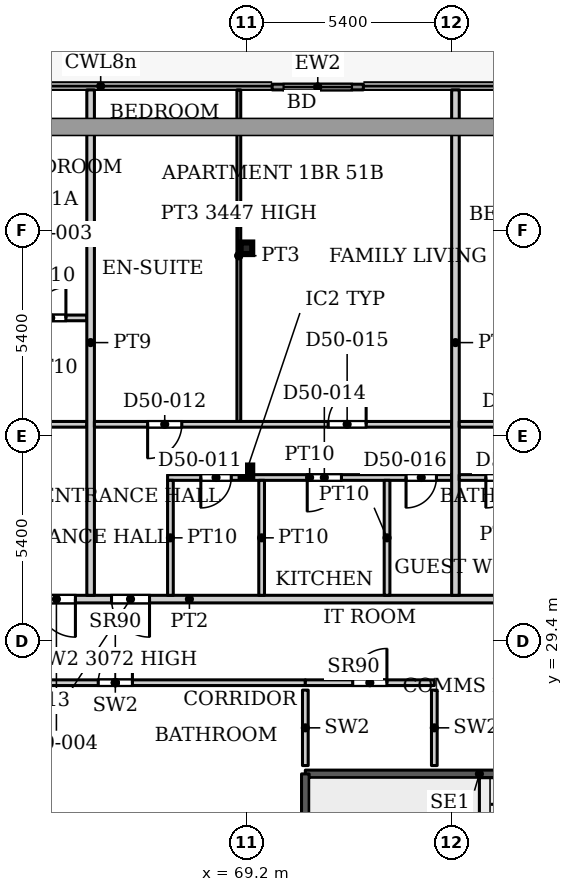
"""IFC4 building model, lengths in metres.
Left out: names, types, materials, properties, quantities, classifications, styles, units other than length and angle.
Written with IfcOpenShell. Run it as: python <this file> out.ifc"""

import sys

from ifc_helpers import new_model, si_unit, direction, frame, frame_2d, origin, origin_2d, place, context, subcontext, project, spatial, rectangle, hollow_rectangle, extrude, source, transform, mapped, element, fill, save


model = new_model("IFC4")
c1 = context("Model", 3, precision=1e-05, world=origin(), true_north=direction((0.0, 1.0)))
c2 = subcontext(c1, "Body", "Model", "MODEL_VIEW")
j1 = project(units=[si_unit("LENGTHUNIT", "METRE"), si_unit("PLANEANGLEUNIT", "RADIAN")], contexts=[c1])
p1 = place(None, origin())
s1 = spatial("IfcSite", under=j1, at=p1, CompositionType="ELEMENT")
p2 = place(p1, origin())
s2 = spatial("IfcBuilding", under=s1, at=p2, CompositionType="ELEMENT")
p3 = place(p2, frame((0.0, 0.0, 220.1)))
s3 = spatial("IfcBuildingStorey", under=s2, at=p3, CompositionType="ELEMENT", Elevation=220.1)
for number, where, z_axis, x_axis in (
    (1, (69.2, 33.863, 0.0), (0.0, 0.0, 1.0), (1.0, 0.0, 0.0)),
    (2, (69.2, 39.732, 0.0), (0.0, 0.0, 1.0), (1.0, 0.0, 0.0)),
):
    element("IfcColumn", number, at=place(p3, frame(where, z_axis=z_axis, x_axis=x_axis)), inside=s3, PredefinedType="COLUMN", context=c2, shape_type="SweptSolid", body=[
        extrude(hollow_rectangle(XDim=0.305, YDim=0.305, WallThickness=0.016, InnerFilletRadius=0.016, OuterFilletRadius=0.032, at=origin_2d()), origin(), (0.0, 0.0, 1.0), 3.9),
    ])
p4 = place(p3, frame((69.877, 43.975, 0.0), z_axis=(0.0, 0.0, 1.0), x_axis=(1.0, 0.0, 0.0)))
e3 = element("IfcWall", 3, at=p4, inside=s3, PredefinedType="SOLIDWALL", context=c2, shape_type="SweptSolid", body=[
    extrude(rectangle(XDim=2.4, YDim=0.15, at=frame_2d((1.2, 0.0))), origin(), (0.0, 0.0, 1.0), 3.75),
])
p5 = place(p4, frame((0.3, 0.0, 0.0)))
e4 = element("IfcOpeningElement", 4, at=p5, cuts=e3, PredefinedType="OPENING", context=c2, shape_type="SweptSolid", body=[
    extrude(rectangle(XDim=1.8, YDim=2.4, at=frame_2d((0.9, 1.2))), frame((0.0, 0.085, 0.0), z_axis=(0.0, -1.0, 0.0), x_axis=(1.0, 0.0, 0.0)), (0.0, 0.0, 1.0), 0.17),
])
p6 = place(p3, frame((70.75, 25.9, 0.0), z_axis=(0.0, 0.0, 1.0), x_axis=(1.0, 0.0, 0.0)))
e5 = element("IfcWall", 5, at=p6, inside=s3, PredefinedType="SHEAR", context=c2, shape_type="SweptSolid", body=[
    extrude(rectangle(XDim=9.16, YDim=0.2, at=frame_2d((4.58, 0.0))), origin(), (0.0, 0.0, 1.0), 3.9),
])
p7 = place(p6, frame((7.81, 0.0, 0.0)))
e6 = element("IfcOpeningElement", 6, at=p7, cuts=e5, PredefinedType="OPENING", context=c2, shape_type="SweptSolid", body=[
    extrude(rectangle(XDim=1.1, YDim=2.2, at=frame_2d((0.55, 1.1))), frame((0.0, 0.11, 0.0), z_axis=(0.0, -1.0, 0.0), x_axis=(1.0, 0.0, 0.0)), (0.0, 0.0, 1.0), 0.22),
])
p8 = place(p3, frame((70.75, 22.75, 0.0), z_axis=(0.0, 0.0, 1.0), x_axis=(0.0, 1.0, 0.0)))
e7 = element("IfcWall", 7, at=p8, inside=s3, PredefinedType="SHEAR", context=c2, shape_type="SweptSolid", body=[
    extrude(rectangle(XDim=3.15, YDim=0.2, at=frame_2d((1.575, 0.0))), origin(), (0.0, 0.0, 1.0), 3.9),
])
p9 = place(p3, frame((60.75, 28.3, 0.0), z_axis=(0.0, 0.0, 1.0), x_axis=(1.0, 0.0, 0.0)))
e8 = element("IfcWall", 8, at=p9, inside=s3, PredefinedType="PARTITIONING", context=c2, shape_type="SweptSolid", body=[
    extrude(rectangle(XDim=10.0, YDim=0.15, at=frame_2d((5.0, 0.0))), origin(), (0.0, 0.0, 1.0), 3.072),
])
p10 = place(p9, frame((4.55, 0.0, 0.0)))
e9 = element("IfcOpeningElement", 9, at=p10, cuts=e8, PredefinedType="OPENING", context=c2, shape_type="SweptSolid", body=[
    extrude(rectangle(XDim=0.9, YDim=2.2, at=frame_2d((0.45, 1.1))), frame((0.0, 0.085, 0.0), z_axis=(0.0, -1.0, 0.0), x_axis=(1.0, 0.0, 0.0)), (0.0, 0.0, 1.0), 0.17),
])
p11 = place(p3, frame((70.75, 26.12, 0.0), z_axis=(0.0, 0.0, 1.0), x_axis=(0.0, 1.0, 0.0)))
e10 = element("IfcWall", 10, at=p11, inside=s3, PredefinedType="PARTITIONING", context=c2, shape_type="SweptSolid", body=[
    extrude(rectangle(XDim=1.985, YDim=0.15, at=frame_2d((0.992, 0.0))), origin(), (0.0, 0.0, 1.0), 3.9),
])
p12 = place(p3, frame((70.75, 28.3, 0.0), z_axis=(0.0, 0.0, 1.0), x_axis=(1.0, 0.0, 0.0)))
e11 = element("IfcWall", 11, at=p12, inside=s3, PredefinedType="PARTITIONING", context=c2, shape_type="SweptSolid", body=[
    extrude(rectangle(XDim=3.394, YDim=0.15, at=frame_2d((1.697, 0.0))), origin(), (0.0, 0.0, 1.0), 3.9),
])
p13 = place(p12, frame((1.247, 0.0, 0.0)))
e12 = element("IfcOpeningElement", 12, at=p13, cuts=e11, PredefinedType="OPENING", context=c2, shape_type="SweptSolid", body=[
    extrude(rectangle(XDim=0.9, YDim=2.2, at=frame_2d((0.45, 1.1))), frame((0.0, 0.085, 0.0), z_axis=(0.0, -1.0, 0.0), x_axis=(1.0, 0.0, 0.0)), (0.0, 0.0, 1.0), 0.17),
])
p14 = place(p3, frame((74.144, 26.12, 0.0), z_axis=(0.0, 0.0, 1.0), x_axis=(0.0, 1.0, 0.0)))
e13 = element("IfcWall", 13, at=p14, inside=s3, PredefinedType="PARTITIONING", context=c2, shape_type="SweptSolid", body=[
    extrude(rectangle(XDim=1.985, YDim=0.15, at=frame_2d((0.992, 0.0))), origin(), (0.0, 0.0, 1.0), 3.9),
])
p15 = place(p3, frame((53.499, 30.5, 0.0), z_axis=(0.0, 0.0, 1.0), x_axis=(1.0, 0.0, 0.0)))
e14 = element("IfcWall", 14, at=p15, inside=s3, PredefinedType="PARTITIONING", context=c2, shape_type="SweptSolid", body=[
    extrude(rectangle(XDim=28.401, YDim=0.2, at=frame_2d((14.2, 0.0))), origin(), (0.0, 0.0, 1.0), 3.6),
])
p16 = place(p15, frame((10.201, 0.0, 0.0)))
e15 = element("IfcOpeningElement", 15, at=p16, cuts=e14, PredefinedType="OPENING", context=c2, shape_type="SweptSolid", body=[
    extrude(rectangle(XDim=1.0, YDim=2.1, at=frame_2d((0.5, 1.05))), frame((0.0, 0.11, 0.0), z_axis=(0.0, -1.0, 0.0), x_axis=(1.0, 0.0, 0.0)), (0.0, 0.0, 1.0), 0.22),
])
p17 = place(p15, frame((12.151, 0.0, 0.0)))
e16 = element("IfcOpeningElement", 16, at=p17, cuts=e14, PredefinedType="OPENING", context=c2, shape_type="SweptSolid", body=[
    extrude(rectangle(XDim=1.0, YDim=2.1, at=frame_2d((0.5, 1.05))), frame((0.0, 0.11, 0.0), z_axis=(0.0, -1.0, 0.0), x_axis=(1.0, 0.0, 0.0)), (0.0, 0.0, 1.0), 0.22),
])
p18 = place(p15, frame((24.001, 0.0, 0.0)))
e17 = element("IfcOpeningElement", 17, at=p18, cuts=e14, PredefinedType="OPENING", context=c2, shape_type="SweptSolid", body=[
    extrude(rectangle(XDim=1.0, YDim=2.1, at=frame_2d((0.5, 1.05))), frame((0.0, 0.11, 0.0), z_axis=(0.0, -1.0, 0.0), x_axis=(1.0, 0.0, 0.0)), (0.0, 0.0, 1.0), 0.22),
])
p19 = place(p3, frame((53.499, 35.1, 0.0), z_axis=(0.0, 0.0, 1.0), x_axis=(1.0, 0.0, 0.0)))
e18 = element("IfcWall", 18, at=p19, inside=s3, PredefinedType="PARTITIONING", context=c2, shape_type="SweptSolid", body=[
    extrude(rectangle(XDim=11.501, YDim=0.15, at=frame_2d((5.75, 0.0))), origin(), (0.0, 0.0, 1.0), 3.6),
])
p20 = place(p19, frame((5.001, 0.0, 0.0)))
e19 = element("IfcOpeningElement", 19, at=p20, cuts=e18, PredefinedType="OPENING", context=c2, shape_type="SweptSolid", body=[
    extrude(rectangle(XDim=0.9, YDim=2.1, at=frame_2d((0.45, 1.05))), frame((0.0, 0.085, 0.0), z_axis=(0.0, -1.0, 0.0), x_axis=(1.0, 0.0, 0.0)), (0.0, 0.0, 1.0), 0.17),
])
p21 = place(p19, frame((1.701, 0.0, 0.0)))
e20 = element("IfcOpeningElement", 20, at=p21, cuts=e18, PredefinedType="OPENING", context=c2, shape_type="SweptSolid", body=[
    extrude(rectangle(XDim=1.0, YDim=2.1, at=frame_2d((0.5, 1.05))), frame((0.0, 0.085, 0.0), z_axis=(0.0, -1.0, 0.0), x_axis=(1.0, 0.0, 0.0)), (0.0, 0.0, 1.0), 0.17),
])
p22 = place(p19, frame((7.701, 0.0, 0.0)))
e21 = element("IfcOpeningElement", 21, at=p22, cuts=e18, PredefinedType="OPENING", context=c2, shape_type="SweptSolid", body=[
    extrude(rectangle(XDim=0.9, YDim=2.1, at=frame_2d((0.45, 1.05))), frame((0.0, 0.085, 0.0), z_axis=(0.0, -1.0, 0.0), x_axis=(1.0, 0.0, 0.0)), (0.0, 0.0, 1.0), 0.17),
])
p23 = place(p3, frame((63.075, 37.9, 0.0), z_axis=(0.0, 0.0, 1.0), x_axis=(1.0, 0.0, 0.0)))
e22 = element("IfcWall", 22, at=p23, inside=s3, PredefinedType="PARTITIONING", context=c2, shape_type="SweptSolid", body=[
    extrude(rectangle(XDim=1.925, YDim=0.15, at=frame_2d((0.962, 0.0))), origin(), (0.0, 0.0, 1.0), 3.6),
])
p24 = place(p23, frame((0.575, 0.0, 0.0)))
e23 = element("IfcOpeningElement", 23, at=p24, cuts=e22, PredefinedType="OPENING", context=c2, shape_type="SweptSolid", body=[
    extrude(rectangle(XDim=0.8, YDim=2.1, at=frame_2d((0.4, 1.05))), frame((0.0, 0.085, 0.0), z_axis=(0.0, -1.0, 0.0), x_axis=(1.0, 0.0, 0.0)), (0.0, 0.0, 1.0), 0.17),
])
p25 = place(p3, frame((65.1, 30.6, 0.0), z_axis=(0.0, 0.0, 1.0), x_axis=(0.0, 1.0, 0.0)))
e24 = element("IfcWall", 24, at=p25, inside=s3, PredefinedType="PARTITIONING", context=c2, shape_type="SweptSolid", body=[
    extrude(rectangle(XDim=13.3, YDim=0.2, at=frame_2d((6.65, 0.0))), origin(), (0.0, 0.0, 1.0), 3.6),
])
p26 = place(p3, frame((65.2, 35.1, 0.0), z_axis=(0.0, 0.0, 1.0), x_axis=(1.0, 0.0, 0.0)))
e25 = element("IfcWall", 25, at=p26, inside=s3, PredefinedType="PARTITIONING", context=c2, shape_type="SweptSolid", body=[
    extrude(rectangle(XDim=9.4, YDim=0.15, at=frame_2d((4.7, 0.0))), origin(), (0.0, 0.0, 1.0), 3.6),
])
p27 = place(p26, frame((1.4, 0.0, 0.0)))
e26 = element("IfcOpeningElement", 26, at=p27, cuts=e25, PredefinedType="OPENING", context=c2, shape_type="SweptSolid", body=[
    extrude(rectangle(XDim=0.9, YDim=2.1, at=frame_2d((0.45, 1.05))), frame((0.0, 0.085, 0.0), z_axis=(0.0, -1.0, 0.0), x_axis=(1.0, 0.0, 0.0)), (0.0, 0.0, 1.0), 0.17),
])
p28 = place(p26, frame((6.15, 0.0, 0.0)))
e27 = element("IfcOpeningElement", 27, at=p28, cuts=e25, PredefinedType="OPENING", context=c2, shape_type="SweptSolid", body=[
    extrude(rectangle(XDim=1.0, YDim=2.1, at=frame_2d((0.5, 1.05))), frame((0.0, 0.085, 0.0), z_axis=(0.0, -1.0, 0.0), x_axis=(1.0, 0.0, 0.0)), (0.0, 0.0, 1.0), 0.17),
])
p29 = place(p3, frame((67.125, 33.7, 0.0), z_axis=(0.0, 0.0, 1.0), x_axis=(1.0, 0.0, 0.0)))
e28 = element("IfcWall", 28, at=p29, inside=s3, PredefinedType="PARTITIONING", context=c2, shape_type="SweptSolid", body=[
    extrude(rectangle(XDim=7.475, YDim=0.15, at=frame_2d((3.738, 0.0))), origin(), (0.0, 0.0, 1.0), 3.6),
])
p30 = place(p29, frame((0.875, 0.0, 0.0)))
e29 = element("IfcOpeningElement", 29, at=p30, cuts=e28, PredefinedType="OPENING", context=c2, shape_type="SweptSolid", body=[
    extrude(rectangle(XDim=0.8, YDim=2.1, at=frame_2d((0.4, 1.05))), frame((0.0, 0.085, 0.0), z_axis=(0.0, -1.0, 0.0), x_axis=(1.0, 0.0, 0.0)), (0.0, 0.0, 1.0), 0.17),
])
p31 = place(p29, frame((3.675, 0.0, 0.0)))
e30 = element("IfcOpeningElement", 30, at=p31, cuts=e28, PredefinedType="OPENING", context=c2, shape_type="SweptSolid", body=[
    extrude(rectangle(XDim=0.9, YDim=2.1, at=frame_2d((0.45, 1.05))), frame((0.0, 0.085, 0.0), z_axis=(0.0, -1.0, 0.0), x_axis=(1.0, 0.0, 0.0)), (0.0, 0.0, 1.0), 0.17),
])
p32 = place(p29, frame((6.275, 0.0, 0.0)))
e31 = element("IfcOpeningElement", 31, at=p32, cuts=e28, PredefinedType="OPENING", context=c2, shape_type="SweptSolid", body=[
    extrude(rectangle(XDim=0.8, YDim=2.1, at=frame_2d((0.4, 1.05))), frame((0.0, 0.085, 0.0), z_axis=(0.0, -1.0, 0.0), x_axis=(1.0, 0.0, 0.0)), (0.0, 0.0, 1.0), 0.17),
])
p33 = place(p3, frame((67.2, 30.6, 0.0), z_axis=(0.0, 0.0, 1.0), x_axis=(0.0, 1.0, 0.0)))
e32 = element("IfcWall", 32, at=p33, inside=s3, PredefinedType="PARTITIONING", context=c2, shape_type="SweptSolid", body=[
    extrude(rectangle(XDim=3.025, YDim=0.15, at=frame_2d((1.512, 0.0))), origin(), (0.0, 0.0, 1.0), 3.6),
])
p34 = place(p3, frame((69.0, 35.175, 0.0), z_axis=(0.0, 0.0, 1.0), x_axis=(0.0, 1.0, 0.0)))
e33 = element("IfcWall", 33, at=p34, inside=s3, PredefinedType="PARTITIONING", context=c2, shape_type="SweptSolid", body=[
    extrude(rectangle(XDim=8.725, YDim=0.1, at=frame_2d((4.362, 0.0))), origin(), (0.0, 0.0, 1.0), 3.447),
])
for number, where, z_axis, x_axis in (
    (34, (69.6, 30.6, 0.0), (0.0, 0.0, 1.0), (0.0, 1.0, 0.0)),
    (35, (72.9, 30.6, 0.0), (0.0, 0.0, 1.0), (0.0, 1.0, 0.0)),
):
    element("IfcWall", number, at=place(p3, frame(where, z_axis=z_axis, x_axis=x_axis)), inside=s3, PredefinedType="PARTITIONING", context=c2, shape_type="SweptSolid", body=[
        extrude(rectangle(XDim=3.025, YDim=0.15, at=frame_2d((1.512, 0.0))), origin(), (0.0, 0.0, 1.0), 3.6),
    ])
p35 = place(p3, frame((74.7, 30.6, 0.0), z_axis=(0.0, 0.0, 1.0), x_axis=(0.0, 1.0, 0.0)))
e36 = element("IfcWall", 36, at=p35, inside=s3, PredefinedType="PARTITIONING", context=c2, shape_type="SweptSolid", body=[
    extrude(rectangle(XDim=13.3, YDim=0.2, at=frame_2d((6.65, 0.0))), origin(), (0.0, 0.0, 1.0), 3.6),
])
p36 = place(p3, frame((74.8, 33.7, 0.0), z_axis=(0.0, 0.0, 1.0), x_axis=(1.0, 0.0, 0.0)))
e37 = element("IfcWall", 37, at=p36, inside=s3, PredefinedType="PARTITIONING", context=c2, shape_type="SweptSolid", body=[
    extrude(rectangle(XDim=2.225, YDim=0.15, at=frame_2d((1.112, 0.0))), origin(), (0.0, 0.0, 1.0), 3.6),
])
p37 = place(p36, frame((0.7, 0.0, 0.0)))
e38 = element("IfcOpeningElement", 38, at=p37, cuts=e37, PredefinedType="OPENING", context=c2, shape_type="SweptSolid", body=[
    extrude(rectangle(XDim=0.8, YDim=2.1, at=frame_2d((0.4, 1.05))), frame((0.0, 0.085, 0.0), z_axis=(0.0, -1.0, 0.0), x_axis=(1.0, 0.0, 0.0)), (0.0, 0.0, 1.0), 0.17),
])
p38 = place(p3, frame((74.8, 35.1, 0.0), z_axis=(0.0, 0.0, 1.0), x_axis=(1.0, 0.0, 0.0)))
e39 = element("IfcWall", 39, at=p38, inside=s3, PredefinedType="PARTITIONING", context=c2, shape_type="SweptSolid", body=[
    extrude(rectangle(XDim=8.9, YDim=0.15, at=frame_2d((4.45, 0.0))), origin(), (0.0, 0.0, 1.0), 3.6),
])
p39 = place(p38, frame((1.25, 0.0, 0.0)))
e40 = element("IfcOpeningElement", 40, at=p39, cuts=e39, PredefinedType="OPENING", context=c2, shape_type="SweptSolid", body=[
    extrude(rectangle(XDim=0.9, YDim=2.1, at=frame_2d((0.45, 1.05))), frame((0.0, 0.085, 0.0), z_axis=(0.0, -1.0, 0.0), x_axis=(1.0, 0.0, 0.0)), (0.0, 0.0, 1.0), 0.17),
])
p40 = place(p38, frame((5.7, 0.0, 0.0)))
e41 = element("IfcOpeningElement", 41, at=p40, cuts=e39, PredefinedType="OPENING", context=c2, shape_type="SweptSolid", body=[
    extrude(rectangle(XDim=1.0, YDim=2.1, at=frame_2d((0.5, 1.05))), frame((0.0, 0.085, 0.0), z_axis=(0.0, -1.0, 0.0), x_axis=(1.0, 0.0, 0.0)), (0.0, 0.0, 1.0), 0.17),
])
m1 = source(origin(), c2, "Body", "SweptSolid", [
    extrude(rectangle(XDim=1.8, YDim=2.4, at=frame_2d((0.9, 1.2))), frame((0.0, 0.025, 0.0), z_axis=(0.0, -1.0, 0.0), x_axis=(1.0, 0.0, 0.0)), (0.0, 0.0, 1.0), 0.05),
])
p41 = place(p5, origin())
e42 = element("IfcDoor", 42, at=p41, inside=s3, OperationType="SLIDING_TO_LEFT", PredefinedType="DOOR", context=c2, shape_type="MappedRepresentation", body=[
    mapped(m1, transform((0.0, 0.0, 0.0), x_axis=(1.0, 0.0, 0.0), y_axis=(0.0, 1.0, 0.0), z_axis=(0.0, 0.0, 1.0), scale=1.0)),
])
fill(e4, e42)
m2 = source(origin(), c2, "Body", "SweptSolid", [
    extrude(rectangle(XDim=0.9, YDim=2.2, at=frame_2d((0.45, 1.1))), frame((0.0, 0.025, 0.0), z_axis=(0.0, -1.0, 0.0), x_axis=(1.0, 0.0, 0.0)), (0.0, 0.0, 1.0), 0.05),
])
p42 = place(p10, origin())
e43 = element("IfcDoor", 43, at=p42, inside=s3, OperationType="SINGLE_SWING_LEFT", PredefinedType="DOOR", context=c2, shape_type="MappedRepresentation", body=[
    mapped(m2, transform((0.0, 0.0, 0.0), x_axis=(1.0, 0.0, 0.0), y_axis=(0.0, 1.0, 0.0), z_axis=(0.0, 0.0, 1.0), scale=1.0)),
])
fill(e9, e43)
p43 = place(p13, origin())
e44 = element("IfcDoor", 44, at=p43, inside=s3, OperationType="SINGLE_SWING_LEFT", PredefinedType="DOOR", context=c2, shape_type="MappedRepresentation", body=[
    mapped(m2, transform((0.0, 0.0, 0.0), x_axis=(1.0, 0.0, 0.0), y_axis=(0.0, 1.0, 0.0), z_axis=(0.0, 0.0, 1.0), scale=1.0)),
])
fill(e12, e44)
m3 = source(origin(), c2, "Body", "SweptSolid", [
    extrude(rectangle(XDim=0.8, YDim=2.1, at=frame_2d((0.4, 1.05))), frame((0.0, 0.025, 0.0), z_axis=(0.0, -1.0, 0.0), x_axis=(1.0, 0.0, 0.0)), (0.0, 0.0, 1.0), 0.05),
])
p44 = place(p24, origin())
e45 = element("IfcDoor", 45, at=p44, inside=s3, OperationType="SINGLE_SWING_LEFT", PredefinedType="DOOR", context=c2, shape_type="MappedRepresentation", body=[
    mapped(m3, transform((0.0, 0.0, 0.0), x_axis=(1.0, 0.0, 0.0), y_axis=(0.0, 1.0, 0.0), z_axis=(0.0, 0.0, 1.0), scale=1.0)),
])
fill(e23, e45)
m4 = source(origin(), c2, "Body", "SweptSolid", [
    extrude(rectangle(XDim=1.0, YDim=2.1, at=frame_2d((0.5, 1.05))), frame((0.0, 0.025, 0.0), z_axis=(0.0, -1.0, 0.0), x_axis=(1.0, 0.0, 0.0)), (0.0, 0.0, 1.0), 0.05),
])
p45 = place(p16, origin())
e46 = element("IfcDoor", 46, at=p45, inside=s3, OperationType="SINGLE_SWING_RIGHT", PredefinedType="DOOR", context=c2, shape_type="MappedRepresentation", body=[
    mapped(m4, transform((0.0, 0.0, 0.0), x_axis=(1.0, 0.0, 0.0), y_axis=(0.0, 1.0, 0.0), z_axis=(0.0, 0.0, 1.0), scale=1.0)),
])
fill(e15, e46)
p46 = place(p30, origin())
e47 = element("IfcDoor", 47, at=p46, inside=s3, OperationType="SINGLE_SWING_RIGHT", PredefinedType="DOOR", context=c2, shape_type="MappedRepresentation", body=[
    mapped(m3, transform((0.0, 0.0, 0.0), x_axis=(1.0, 0.0, 0.0), y_axis=(0.0, 1.0, 0.0), z_axis=(0.0, 0.0, 1.0), scale=1.0)),
])
fill(e29, e47)
m5 = source(origin(), c2, "Body", "SweptSolid", [
    extrude(rectangle(XDim=0.9, YDim=2.1, at=frame_2d((0.45, 1.05))), frame((0.0, 0.025, 0.0), z_axis=(0.0, -1.0, 0.0), x_axis=(1.0, 0.0, 0.0)), (0.0, 0.0, 1.0), 0.05),
])
p47 = place(p27, origin())
e48 = element("IfcDoor", 48, at=p47, inside=s3, OperationType="SINGLE_SWING_RIGHT", PredefinedType="DOOR", context=c2, shape_type="MappedRepresentation", body=[
    mapped(m5, transform((0.0, 0.0, 0.0), x_axis=(1.0, 0.0, 0.0), y_axis=(0.0, 1.0, 0.0), z_axis=(0.0, 0.0, 1.0), scale=1.0)),
])
fill(e26, e48)
p48 = place(p17, origin())
e49 = element("IfcDoor", 49, at=p48, inside=s3, OperationType="SINGLE_SWING_RIGHT", PredefinedType="DOOR", context=c2, shape_type="MappedRepresentation", body=[
    mapped(m4, transform((0.0, 0.0, 0.0), x_axis=(1.0, 0.0, 0.0), y_axis=(0.0, 1.0, 0.0), z_axis=(0.0, 0.0, 1.0), scale=1.0)),
])
fill(e16, e49)
p49 = place(p31, origin())
e50 = element("IfcDoor", 50, at=p49, inside=s3, OperationType="SINGLE_SWING_RIGHT", PredefinedType="DOOR", context=c2, shape_type="MappedRepresentation", body=[
    mapped(m5, transform((0.0, 0.0, 0.0), x_axis=(1.0, 0.0, 0.0), y_axis=(0.0, 1.0, 0.0), z_axis=(0.0, 0.0, 1.0), scale=1.0)),
])
fill(e30, e50)
m6 = source(origin(), c2, "Body", "SweptSolid", [
    extrude(rectangle(XDim=1.0, YDim=2.1, at=frame_2d((0.5, 1.05))), frame((0.0, 0.025, 0.0), z_axis=(0.0, -1.0, 0.0), x_axis=(1.0, 0.0, 0.0)), (0.0, 0.0, 1.0), 0.05),
])
p50 = place(p28, origin())
e51 = element("IfcDoor", 51, at=p50, inside=s3, OperationType="SINGLE_SWING_LEFT", PredefinedType="DOOR", context=c2, shape_type="MappedRepresentation", body=[
    mapped(m6, transform((0.0, 0.0, 0.0), x_axis=(1.0, 0.0, 0.0), y_axis=(0.0, 1.0, 0.0), z_axis=(0.0, 0.0, 1.0), scale=1.0)),
])
fill(e27, e51)
p51 = place(p32, origin())
e52 = element("IfcDoor", 52, at=p51, inside=s3, OperationType="SINGLE_SWING_RIGHT", PredefinedType="DOOR", context=c2, shape_type="MappedRepresentation", body=[
    mapped(m3, transform((0.0, 0.0, 0.0), x_axis=(1.0, 0.0, 0.0), y_axis=(0.0, 1.0, 0.0), z_axis=(0.0, 0.0, 1.0), scale=1.0)),
])
fill(e31, e52)
p52 = place(p37, origin())
e53 = element("IfcDoor", 53, at=p52, inside=s3, OperationType="SINGLE_SWING_RIGHT", PredefinedType="DOOR", context=c2, shape_type="MappedRepresentation", body=[
    mapped(m3, transform((0.0, 0.0, 0.0), x_axis=(1.0, 0.0, 0.0), y_axis=(0.0, 1.0, 0.0), z_axis=(0.0, 0.0, 1.0), scale=1.0)),
])
fill(e38, e53)
save(model, sys.argv[1])
